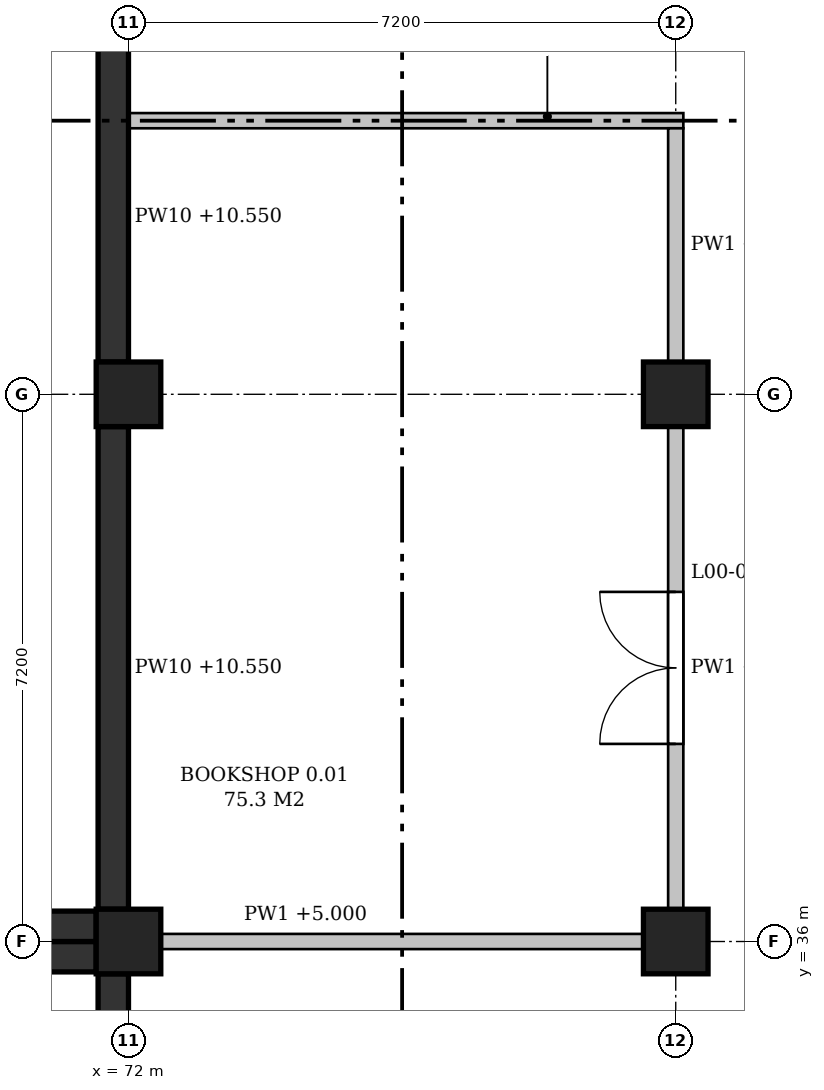
"""IFC4 building model, lengths in metres.
Left out: names, types, materials, properties, quantities, classifications, styles, units other than length and angle.
Written with IfcOpenShell. Run it as: python <this file> out.ifc"""

import sys

from ifc_helpers import new_model, si_unit, direction, frame, frame_2d, origin, origin_2d, place, context, subcontext, project, spatial, polyline, rectangle, outline, extrude, element, fill, save


model = new_model("IFC4")
c1 = context("Model", 3, precision=1e-05, world=origin(), true_north=direction((0.0, 1.0)))
c2 = subcontext(c1, "Body", "Model", "MODEL_VIEW")
j1 = project(units=[si_unit("LENGTHUNIT", "METRE"), si_unit("PLANEANGLEUNIT", "RADIAN")], contexts=[c1])
p1 = place(None, origin())
s1 = spatial("IfcSite", under=j1, at=p1, CompositionType="ELEMENT")
p2 = place(p1, origin())
s2 = spatial("IfcBuilding", under=s1, at=p2, CompositionType="ELEMENT")
p3 = place(p2, origin())
s3 = spatial("IfcBuildingStorey", under=s2, at=p3, CompositionType="ELEMENT", Elevation=0.0)
for number, where, z_axis, x_axis in (
    (1, (72.0, 36.0, 0.0), (0.0, 0.0, 1.0), (1.0, 0.0, 0.0)),
    (2, (72.0, 43.2, 0.0), (0.0, 0.0, 1.0), (1.0, 0.0, 0.0)),
    (3, (79.2, 36.0, 0.0), (0.0, 0.0, 1.0), (1.0, 0.0, 0.0)),
    (4, (79.2, 43.2, 0.0), (0.0, 0.0, 1.0), (1.0, 0.0, 0.0)),
):
    element("IfcColumn", number, at=place(p3, frame(where, z_axis=z_axis, x_axis=x_axis)), inside=s3, PredefinedType="COLUMN", context=c2, shape_type="SweptSolid", body=[
        extrude(rectangle(XDim=0.85, YDim=0.85, at=origin_2d()), origin(), (0.0, 0.0, 1.0), 6.0),
    ])
p4 = place(p3, frame((65.225, 35.8, 0.0), z_axis=(0.0, 0.0, 1.0), x_axis=(1.0, 0.0, 0.0)))
e5 = element("IfcWall", 5, at=p4, inside=s3, PredefinedType="SOLIDWALL", context=c2, shape_type="SweptSolid", body=[
    extrude(rectangle(XDim=6.35, YDim=0.4, at=frame_2d((3.175, 0.0))), origin(), (0.0, 0.0, 1.0), 10.7),
])
p5 = place(p3, frame((72.425, 36.0, 0.0), z_axis=(0.0, 0.0, 1.0), x_axis=(1.0, 0.0, 0.0)))
e6 = element("IfcWall", 6, at=p5, inside=s3, PredefinedType="PARTITIONING", context=c2, shape_type="SweptSolid", body=[
    extrude(rectangle(XDim=6.35, YDim=0.2, at=frame_2d((3.175, 0.0))), origin(), (0.0, 0.0, 1.0), 5.0),
])
p6 = place(p3, frame((65.225, 36.2, 0.0), z_axis=(0.0, 0.0, 1.0), x_axis=(1.0, 0.0, 0.0)))
e7 = element("IfcWall", 7, at=p6, inside=s3, PredefinedType="SOLIDWALL", context=c2, shape_type="SweptSolid", body=[
    extrude(rectangle(XDim=6.35, YDim=0.4, at=frame_2d((3.175, 0.0))), origin(), (0.0, 0.0, 1.0), 10.7),
])
p7 = place(p3, frame((72.0, 46.8, 0.0), z_axis=(0.0, 0.0, 1.0), x_axis=(1.0, 0.0, 0.0)))
e8 = element("IfcWall", 8, at=p7, inside=s3, PredefinedType="PARTITIONING", context=c2, shape_type="SweptSolid", body=[
    extrude(outline(polyline([(0.0, 0.0), (7.3, 0.0), (7.3, 5.0), (6.95, 5.0), (6.95, 5.75), (0.55, 5.75), (0.55, 5.05), (0.0, 5.05), (0.0, 0.0)])), frame((0.0, 0.1, 0.0), z_axis=(0.0, -1.0, 0.0), x_axis=(1.0, 0.0, 0.0)), (0.0, 0.0, 1.0), 0.2),
])
p8 = place(p3, frame((71.8, 29.225, 0.0), z_axis=(0.0, 0.0, 1.0), x_axis=(0.0, 1.0, 0.0)))
e9 = element("IfcWall", 9, at=p8, inside=s3, PredefinedType="SOLIDWALL", context=c2, shape_type="SweptSolid", body=[
    extrude(rectangle(XDim=6.35, YDim=0.4, at=frame_2d((3.175, 0.0))), origin(), (0.0, 0.0, 1.0), 10.55),
])
p9 = place(p8, frame((2.575, 0.0, 0.0)))
e10 = element("IfcOpeningElement", 10, at=p9, cuts=e9, PredefinedType="OPENING", context=c2, shape_type="SweptSolid", body=[
    extrude(rectangle(XDim=1.2, YDim=2.1, at=frame_2d((0.6, 1.05))), frame((0.0, 0.21, 0.0), z_axis=(0.0, -1.0, 0.0), x_axis=(1.0, 0.0, 0.0)), (0.0, 0.0, 1.0), 0.42),
])
p10 = place(p8, frame((4.65, 0.0, 0.0)))
e11 = element("IfcOpeningElement", 11, at=p10, cuts=e9, PredefinedType="OPENING", context=c2, shape_type="SweptSolid", body=[
    extrude(rectangle(XDim=1.2, YDim=2.1, at=frame_2d((0.6, 1.05))), frame((0.0, 0.21, 0.0), z_axis=(0.0, -1.0, 0.0), x_axis=(1.0, 0.0, 0.0)), (0.0, 0.0, 1.0), 0.42),
])
p11 = place(p3, frame((71.8, 36.425, 0.0), z_axis=(0.0, 0.0, 1.0), x_axis=(0.0, 1.0, 0.0)))
e12 = element("IfcWall", 12, at=p11, inside=s3, PredefinedType="SOLIDWALL", context=c2, shape_type="SweptSolid", body=[
    extrude(rectangle(XDim=6.35, YDim=0.4, at=frame_2d((3.175, 0.0))), origin(), (0.0, 0.0, 1.0), 10.55),
])
p12 = place(p3, frame((71.8, 43.625, 0.0), z_axis=(0.0, 0.0, 1.0), x_axis=(0.0, 1.0, 0.0)))
e13 = element("IfcWall", 13, at=p12, inside=s3, PredefinedType="SOLIDWALL", context=c2, shape_type="SweptSolid", body=[
    extrude(rectangle(XDim=6.35, YDim=0.4, at=frame_2d((3.175, 0.0))), origin(), (0.0, 0.0, 1.0), 10.55),
])
p13 = place(p3, frame((79.2, 36.425, 0.0), z_axis=(0.0, 0.0, 1.0), x_axis=(0.0, 1.0, 0.0)))
e14 = element("IfcWall", 14, at=p13, inside=s3, PredefinedType="PARTITIONING", context=c2, shape_type="SweptSolid", body=[
    extrude(rectangle(XDim=6.35, YDim=0.2, at=frame_2d((3.175, 0.0))), origin(), (0.0, 0.0, 1.0), 5.0),
])
p14 = place(p13, frame((2.175, 0.0, 0.0)))
e15 = element("IfcOpeningElement", 15, at=p14, cuts=e14, PredefinedType="OPENING", context=c2, shape_type="SweptSolid", body=[
    extrude(rectangle(XDim=2.0, YDim=2.1, at=frame_2d((1.0, 1.05))), frame((0.0, 0.11, 0.0), z_axis=(0.0, -1.0, 0.0), x_axis=(1.0, 0.0, 0.0)), (0.0, 0.0, 1.0), 0.22),
])
p15 = place(p3, frame((79.2, 43.625, 0.0), z_axis=(0.0, 0.0, 1.0), x_axis=(0.0, 1.0, 0.0)))
e16 = element("IfcWall", 16, at=p15, inside=s3, PredefinedType="PARTITIONING", context=c2, shape_type="SweptSolid", body=[
    extrude(rectangle(XDim=3.075, YDim=0.2, at=frame_2d((1.538, 0.0))), origin(), (0.0, 0.0, 1.0), 5.0),
])
p16 = place(p14, origin())
e17 = element("IfcDoor", 17, at=p16, inside=s3, OperationType="DOUBLE_DOOR_SINGLE_SWING", PredefinedType="DOOR", context=c2, shape_type="SweptSolid", body=[
    extrude(rectangle(XDim=2.0, YDim=2.1, at=frame_2d((1.0, 1.05))), frame((0.0, 0.025, 0.0), z_axis=(0.0, -1.0, 0.0), x_axis=(1.0, 0.0, 0.0)), (0.0, 0.0, 1.0), 0.05),
])
fill(e15, e17)
save(model, sys.argv[1])
